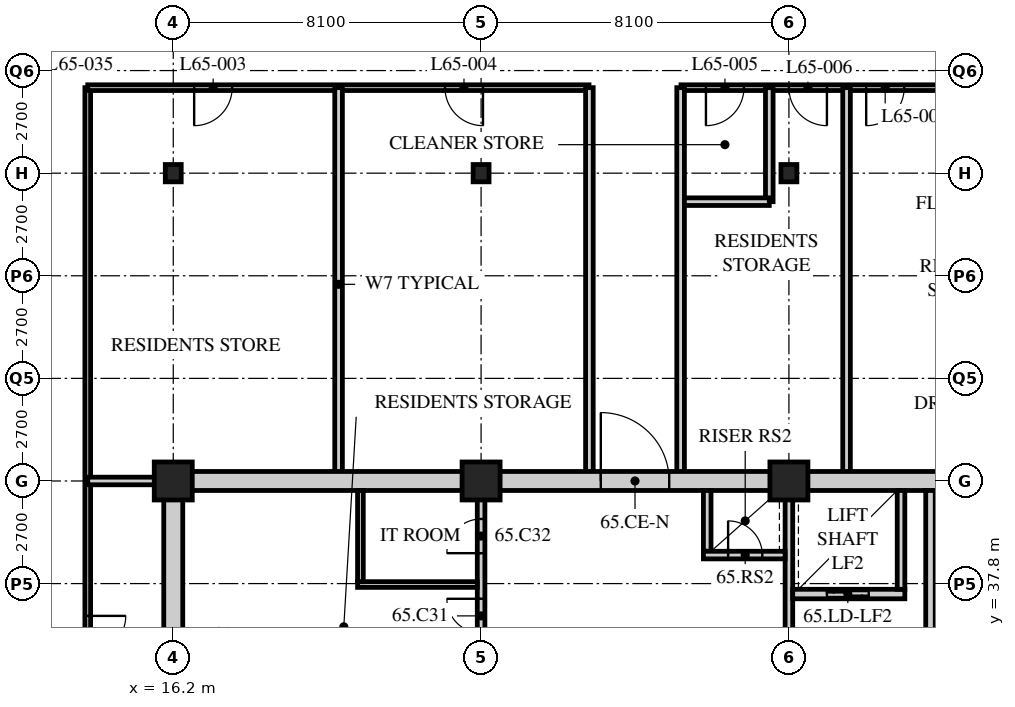
"""IFC4 building model, lengths in metres.
Left out: names, types, materials, properties, quantities, classifications, styles, units other than length and angle.
Written with IfcOpenShell. Run it as: python <this file> out.ifc"""

import sys

from ifc_helpers import new_model, si_unit, direction, frame, frame_2d, origin, origin_2d, place, context, subcontext, project, spatial, rectangle, hollow_rectangle, i_section, extrude, element, fill, save


model = new_model("IFC4")
c1 = context("Model", 3, precision=1e-05, world=origin(), true_north=direction((0.0, 1.0)))
c2 = subcontext(c1, "Body", "Model", "MODEL_VIEW")
j1 = project(units=[si_unit("LENGTHUNIT", "METRE"), si_unit("PLANEANGLEUNIT", "RADIAN")], contexts=[c1])
p1 = place(None, origin())
s1 = spatial("IfcSite", under=j1, at=p1, CompositionType="ELEMENT")
p2 = place(p1, origin())
s2 = spatial("IfcBuilding", under=s1, at=p2, CompositionType="ELEMENT")
p3 = place(p2, frame((0.0, 0.0, 254.1)))
s3 = spatial("IfcBuildingStorey", under=s2, at=p3, CompositionType="ELEMENT", Elevation=254.1)
p4 = place(p3, frame((16.2, 40.5, 0.0), z_axis=(0.0, 0.0, 1.0), x_axis=(1.0, 0.0, 0.0)))
e1 = element("IfcColumn", 1, at=p4, inside=s3, PredefinedType="COLUMN", context=c2, shape_type="SweptSolid", body=[
    extrude(hollow_rectangle(XDim=1.0, YDim=1.0, WallThickness=0.1, at=origin_2d()), origin(), (0.0, 0.0, 1.0), 3.9),
])
p5 = place(p3, frame((16.2, 48.6, 0.0), z_axis=(0.0, 0.0, 1.0), x_axis=(1.0, 0.0, 0.0)))
e2 = element("IfcColumn", 2, at=p5, inside=s3, PredefinedType="COLUMN", context=c2, shape_type="SweptSolid", body=[
    extrude(i_section(OverallWidth=0.418, OverallDepth=0.456, WebThickness=0.042, FlangeThickness=0.067, FilletRadius=0.015, at=origin_2d()), origin(), (0.0, 0.0, 1.0), 3.9),
])
p6 = place(p3, frame((24.3, 40.5, 0.0), z_axis=(0.0, 0.0, 1.0), x_axis=(1.0, 0.0, 0.0)))
e3 = element("IfcColumn", 3, at=p6, inside=s3, PredefinedType="COLUMN", context=c2, shape_type="SweptSolid", body=[
    extrude(hollow_rectangle(XDim=1.0, YDim=1.0, WallThickness=0.1, at=origin_2d()), origin(), (0.0, 0.0, 1.0), 3.9),
])
p7 = place(p3, frame((24.3, 48.6, 0.0), z_axis=(0.0, 0.0, 1.0), x_axis=(1.0, 0.0, 0.0)))
e4 = element("IfcColumn", 4, at=p7, inside=s3, PredefinedType="COLUMN", context=c2, shape_type="SweptSolid", body=[
    extrude(i_section(OverallWidth=0.418, OverallDepth=0.456, WebThickness=0.042, FlangeThickness=0.067, FilletRadius=0.015, at=origin_2d()), origin(), (0.0, 0.0, 1.0), 3.9),
])
p8 = place(p3, frame((32.4, 40.5, 0.0), z_axis=(0.0, 0.0, 1.0), x_axis=(1.0, 0.0, 0.0)))
e5 = element("IfcColumn", 5, at=p8, inside=s3, PredefinedType="COLUMN", context=c2, shape_type="SweptSolid", body=[
    extrude(hollow_rectangle(XDim=1.0, YDim=1.0, WallThickness=0.1, at=origin_2d()), origin(), (0.0, 0.0, 1.0), 3.9),
])
p9 = place(p3, frame((32.4, 48.6, 0.0), z_axis=(0.0, 0.0, 1.0), x_axis=(1.0, 0.0, 0.0)))
e6 = element("IfcColumn", 6, at=p9, inside=s3, PredefinedType="COLUMN", context=c2, shape_type="SweptSolid", body=[
    extrude(i_section(OverallWidth=0.418, OverallDepth=0.456, WebThickness=0.042, FlangeThickness=0.067, FilletRadius=0.015, at=origin_2d()), origin(), (0.0, 0.0, 1.0), 3.9),
])
p10 = place(p3, frame((13.95, 24.3, 0.0), z_axis=(0.0, 0.0, 1.0), x_axis=(0.0, 1.0, 0.0)))
e7 = element("IfcWall", 7, at=p10, inside=s3, PredefinedType="PARTITIONING", context=c2, shape_type="SweptSolid", body=[
    extrude(rectangle(XDim=26.55, YDim=0.15, at=frame_2d((13.275, 0.0))), origin(), (0.0, 0.0, 1.0), 3.69),
])
p11 = place(p10, frame((3.55, 0.0, 0.0)))
e8 = element("IfcOpeningElement", 8, at=p11, cuts=e7, PredefinedType="OPENING", context=c2, shape_type="SweptSolid", body=[
    extrude(rectangle(XDim=1.0, YDim=2.1, at=frame_2d((0.5, 1.05))), frame((0.0, 0.085, 0.0), z_axis=(0.0, -1.0, 0.0), x_axis=(1.0, 0.0, 0.0)), (0.0, 0.0, 1.0), 0.17),
])
p12 = place(p10, frame((11.65, 0.0, 0.0)))
e9 = element("IfcOpeningElement", 9, at=p12, cuts=e7, PredefinedType="OPENING", context=c2, shape_type="SweptSolid", body=[
    extrude(rectangle(XDim=1.0, YDim=2.1, at=frame_2d((0.5, 1.05))), frame((0.0, 0.085, 0.0), z_axis=(0.0, -1.0, 0.0), x_axis=(1.0, 0.0, 0.0)), (0.0, 0.0, 1.0), 0.17),
])
p13 = place(p3, frame((13.95, 50.85, 0.0), z_axis=(0.0, 0.0, 1.0), x_axis=(1.0, 0.0, 0.0)))
e10 = element("IfcWall", 10, at=p13, inside=s3, PredefinedType="PARTITIONING", context=c2, shape_type="SweptSolid", body=[
    extrude(rectangle(XDim=13.19, YDim=0.15, at=frame_2d((6.595, 0.0))), origin(), (0.0, 0.0, 1.0), 3.69),
])
p14 = place(p13, frame((2.8, 0.0, 0.0)))
e11 = element("IfcOpeningElement", 11, at=p14, cuts=e10, PredefinedType="OPENING", context=c2, shape_type="SweptSolid", body=[
    extrude(rectangle(XDim=1.0, YDim=2.1, at=frame_2d((0.5, 1.05))), frame((0.0, 0.085, 0.0), z_axis=(0.0, -1.0, 0.0), x_axis=(1.0, 0.0, 0.0)), (0.0, 0.0, 1.0), 0.17),
])
p15 = place(p13, frame((9.4, 0.0, 0.0)))
e12 = element("IfcOpeningElement", 12, at=p15, cuts=e10, PredefinedType="OPENING", context=c2, shape_type="SweptSolid", body=[
    extrude(rectangle(XDim=1.0, YDim=2.1, at=frame_2d((0.5, 1.05))), frame((0.0, 0.085, 0.0), z_axis=(0.0, -1.0, 0.0), x_axis=(1.0, 0.0, 0.0)), (0.0, 0.0, 1.0), 0.17),
])
p16 = place(p3, frame((29.56, 50.85, 0.0), z_axis=(0.0, 0.0, 1.0), x_axis=(1.0, 0.0, 0.0)))
e13 = element("IfcWall", 13, at=p16, inside=s3, PredefinedType="PARTITIONING", context=c2, shape_type="SweptSolid", body=[
    extrude(rectangle(XDim=6.89, YDim=0.15, at=frame_2d((3.445, 0.0))), origin(), (0.0, 0.0, 1.0), 3.69),
])
p17 = place(p16, frame((0.657, 0.0, 0.0)))
e14 = element("IfcOpeningElement", 14, at=p17, cuts=e13, PredefinedType="OPENING", context=c2, shape_type="SweptSolid", body=[
    extrude(rectangle(XDim=1.0, YDim=2.1, at=frame_2d((0.5, 1.05))), frame((0.0, 0.085, 0.0), z_axis=(0.0, -1.0, 0.0), x_axis=(1.0, 0.0, 0.0)), (0.0, 0.0, 1.0), 0.17),
])
p18 = place(p16, frame((2.84, 0.0, 0.0)))
e15 = element("IfcOpeningElement", 15, at=p18, cuts=e13, PredefinedType="OPENING", context=c2, shape_type="SweptSolid", body=[
    extrude(rectangle(XDim=1.0, YDim=2.1, at=frame_2d((0.5, 1.05))), frame((0.0, 0.085, 0.0), z_axis=(0.0, -1.0, 0.0), x_axis=(1.0, 0.0, 0.0)), (0.0, 0.0, 1.0), 0.17),
])
p19 = place(p16, frame((4.873, 0.0, 0.0)))
e16 = element("IfcOpeningElement", 16, at=p19, cuts=e13, PredefinedType="OPENING", context=c2, shape_type="SweptSolid", body=[
    extrude(rectangle(XDim=1.0, YDim=2.1, at=frame_2d((0.5, 1.05))), frame((0.0, 0.085, 0.0), z_axis=(0.0, -1.0, 0.0), x_axis=(1.0, 0.0, 0.0)), (0.0, 0.0, 1.0), 0.17),
])
p20 = place(p3, frame((20.55, 50.85, 0.0), z_axis=(0.0, 0.0, 1.0), x_axis=(0.0, -1.0, 0.0)))
e17 = element("IfcWall", 17, at=p20, inside=s3, PredefinedType="SOLIDWALL", context=c2, shape_type="SweptSolid", body=[
    extrude(rectangle(XDim=10.35, YDim=0.2, at=frame_2d((5.175, 0.0))), origin(), (0.0, 0.0, 1.0), 3.69),
])
p21 = place(p3, frame((31.883, 50.85, 0.0), z_axis=(0.0, 0.0, 1.0), x_axis=(0.0, -1.0, 0.0)))
e18 = element("IfcWall", 18, at=p21, inside=s3, PredefinedType="SOLIDWALL", context=c2, shape_type="SweptSolid", body=[
    extrude(rectangle(XDim=3.0, YDim=0.2, at=frame_2d((1.5, 0.0))), origin(), (0.0, 0.0, 1.0), 3.69),
])
p22 = place(p3, frame((29.55, 47.85, 0.0), z_axis=(0.0, 0.0, 1.0), x_axis=(1.0, 0.0, 0.0)))
e19 = element("IfcWall", 19, at=p22, inside=s3, PredefinedType="SOLIDWALL", context=c2, shape_type="SweptSolid", body=[
    extrude(rectangle(XDim=2.333, YDim=0.2, at=frame_2d((1.167, 0.0))), origin(), (0.0, 0.0, 1.0), 3.69),
])
for number, where, z_axis, x_axis in (
    (20, (33.917, 50.85, 0.0), (0.0, 0.0, 1.0), (0.0, -1.0, 0.0)),
    (21, (27.15, 40.5, 0.0), (0.0, 0.0, 1.0), (0.0, 1.0, 0.0)),
    (22, (29.55, 40.5, 0.0), (0.0, 0.0, 1.0), (0.0, 1.0, 0.0)),
):
    element("IfcWall", number, at=place(p3, frame(where, z_axis=z_axis, x_axis=x_axis)), inside=s3, PredefinedType="SOLIDWALL", context=c2, shape_type="SweptSolid", body=[
        extrude(rectangle(XDim=10.35, YDim=0.2, at=frame_2d((5.175, 0.0))), origin(), (0.0, 0.0, 1.0), 3.69),
    ])
p23 = place(p3, frame((13.95, 40.5, 0.0), z_axis=(0.0, 0.0, 1.0), x_axis=(1.0, 0.0, 0.0)))
e23 = element("IfcWall", 23, at=p23, inside=s3, PredefinedType="SOLIDWALL", context=c2, shape_type="SweptSolid", body=[
    extrude(rectangle(XDim=2.25, YDim=0.2, at=frame_2d((1.125, 0.0))), origin(), (0.0, 0.0, 1.0), 3.078),
])
p24 = place(p3, frame((15.95, 40.5, 0.0), z_axis=(0.0, 0.0, 1.0), x_axis=(1.0, 0.0, 0.0)))
e24 = element("IfcWall", 24, at=p24, inside=s3, PredefinedType="SOLIDWALL", context=c2, shape_type="SweptSolid", body=[
    extrude(rectangle(XDim=24.55, YDim=0.5, at=frame_2d((12.275, 0.0))), origin(), (0.0, 0.0, 1.0), 3.04),
])
p25 = place(p24, frame((11.5, 0.0, 0.0)))
e25 = element("IfcOpeningElement", 25, at=p25, cuts=e24, PredefinedType="OPENING", context=c2, shape_type="SweptSolid", body=[
    extrude(rectangle(XDim=1.8, YDim=2.4, at=frame_2d((0.9, 1.2))), frame((0.0, 0.26, 0.0), z_axis=(0.0, -1.0, 0.0), x_axis=(1.0, 0.0, 0.0)), (0.0, 0.0, 1.0), 0.52),
])
p26 = place(p3, frame((16.2, 24.55, 0.0), z_axis=(0.0, 0.0, 1.0), x_axis=(0.0, 1.0, 0.0)))
e26 = element("IfcWall", 26, at=p26, inside=s3, PredefinedType="SOLIDWALL", context=c2, shape_type="SweptSolid", body=[
    extrude(rectangle(XDim=15.7, YDim=0.5, at=frame_2d((7.85, 0.0))), origin(), (0.0, 0.0, 1.0), 3.078),
])
p27 = place(p3, frame((32.4, 32.5, 0.0), z_axis=(0.0, 0.0, 1.0), x_axis=(0.0, 1.0, 0.0)))
e27 = element("IfcWall", 27, at=p27, inside=s3, PredefinedType="SOLIDWALL", context=c2, shape_type="SweptSolid", body=[
    extrude(rectangle(XDim=7.75, YDim=0.2, at=frame_2d((3.875, 0.0))), origin(), (0.0, 0.0, 1.0), 3.078),
])
p28 = place(p27, frame((1.9, 0.0, 0.0)))
e28 = element("IfcOpeningElement", 28, at=p28, cuts=e27, PredefinedType="OPENING", context=c2, shape_type="SweptSolid", body=[
    extrude(rectangle(XDim=1.2, YDim=2.1, at=frame_2d((0.6, 1.05))), frame((0.0, 0.11, 0.0), z_axis=(0.0, -1.0, 0.0), x_axis=(1.0, 0.0, 0.0)), (0.0, 0.0, 1.0), 0.22),
])
p29 = place(p3, frame((36.125, 32.5, 0.0), z_axis=(0.0, 0.0, 1.0), x_axis=(0.0, 1.0, 0.0)))
e29 = element("IfcWall", 29, at=p29, inside=s3, PredefinedType="SOLIDWALL", context=c2, shape_type="SweptSolid", body=[
    extrude(rectangle(XDim=7.75, YDim=0.25, at=frame_2d((3.875, 0.0))), origin(), (0.0, 0.0, 1.0), 3.69),
])
p30 = place(p29, frame((0.45, 0.0, 0.0)))
e30 = element("IfcOpeningElement", 30, at=p30, cuts=e29, PredefinedType="OPENING", context=c2, shape_type="SweptSolid", body=[
    extrude(rectangle(XDim=1.2, YDim=2.1, at=frame_2d((0.6, 1.05))), frame((0.0, 0.135, 0.0), z_axis=(0.0, -1.0, 0.0), x_axis=(1.0, 0.0, 0.0)), (0.0, 0.0, 1.0), 0.27),
])
p31 = place(p3, frame((32.5, 37.525, 0.0), z_axis=(0.0, 0.0, 1.0), x_axis=(1.0, 0.0, 0.0)))
e31 = element("IfcWall", 31, at=p31, inside=s3, PredefinedType="SOLIDWALL", context=c2, shape_type="SweptSolid", body=[
    extrude(rectangle(XDim=2.95, YDim=0.25, at=frame_2d((1.475, 0.0))), origin(), (0.0, 0.0, 1.0), 3.69),
])
p32 = place(p31, frame((0.9, 0.0, 0.0)))
e32 = element("IfcOpeningElement", 32, at=p32, cuts=e31, PredefinedType="OPENING", context=c2, shape_type="SweptSolid", body=[
    extrude(rectangle(XDim=1.1, YDim=2.4, at=frame_2d((0.55, 1.2))), frame((0.0, 0.135, 0.0), z_axis=(0.0, -1.0, 0.0), x_axis=(1.0, 0.0, 0.0)), (0.0, 0.0, 1.0), 0.27),
])
p33 = place(p3, frame((35.35, 37.65, 0.0), z_axis=(0.0, 0.0, 1.0), x_axis=(0.0, 1.0, 0.0)))
e33 = element("IfcWall", 33, at=p33, inside=s3, PredefinedType="SOLIDWALL", context=c2, shape_type="SweptSolid", body=[
    extrude(rectangle(XDim=2.6, YDim=0.2, at=frame_2d((1.3, 0.0))), origin(), (0.0, 0.0, 1.0), 3.69),
])
p34 = place(p3, frame((30.25, 38.65, 0.0), z_axis=(0.0, 0.0, 1.0), x_axis=(0.0, 1.0, 0.0)))
e34 = element("IfcWall", 34, at=p34, inside=s3, PredefinedType="SOLIDWALL", context=c2, shape_type="SweptSolid", body=[
    extrude(rectangle(XDim=1.6, YDim=0.2, at=frame_2d((0.8, 0.0))), origin(), (0.0, 0.0, 1.0), 3.69),
])
p35 = place(p3, frame((30.15, 38.55, 0.0), z_axis=(0.0, 0.0, 1.0), x_axis=(1.0, 0.0, 0.0)))
e35 = element("IfcWall", 35, at=p35, inside=s3, PredefinedType="SOLIDWALL", context=c2, shape_type="SweptSolid", body=[
    extrude(rectangle(XDim=2.15, YDim=0.2, at=frame_2d((1.075, 0.0))), origin(), (0.0, 0.0, 1.0), 3.69),
])
p36 = place(p35, frame((0.65, 0.0, 0.0)))
e36 = element("IfcOpeningElement", 36, at=p36, cuts=e35, PredefinedType="OPENING", context=c2, shape_type="SweptSolid", body=[
    extrude(rectangle(XDim=0.9, YDim=2.1, at=frame_2d((0.45, 1.05))), frame((0.0, 0.11, 0.0), z_axis=(0.0, -1.0, 0.0), x_axis=(1.0, 0.0, 0.0)), (0.0, 0.0, 1.0), 0.22),
])
p37 = place(p3, frame((24.3, 32.5, 0.0), z_axis=(0.0, 0.0, 1.0), x_axis=(0.0, 1.0, 0.0)))
e37 = element("IfcWall", 37, at=p37, inside=s3, PredefinedType="PARTITIONING", context=c2, shape_type="SweptSolid", body=[
    extrude(rectangle(XDim=7.75, YDim=0.2, at=frame_2d((3.875, 0.0))), origin(), (0.0, 0.0, 1.0), 3.078),
])
p38 = place(p37, frame((1.275, 0.0, 0.0)))
e38 = element("IfcOpeningElement", 38, at=p38, cuts=e37, PredefinedType="OPENING", context=c2, shape_type="SweptSolid", body=[
    extrude(rectangle(XDim=1.0, YDim=2.1, at=frame_2d((0.5, 1.05))), frame((0.0, 0.11, 0.0), z_axis=(0.0, -1.0, 0.0), x_axis=(1.0, 0.0, 0.0)), (0.0, 0.0, 1.0), 0.22),
])
p39 = place(p37, frame((4.0, 0.0, 0.0)))
e39 = element("IfcOpeningElement", 39, at=p39, cuts=e37, PredefinedType="OPENING", context=c2, shape_type="SweptSolid", body=[
    extrude(rectangle(XDim=0.9, YDim=2.1, at=frame_2d((0.45, 1.05))), frame((0.0, 0.11, 0.0), z_axis=(0.0, -1.0, 0.0), x_axis=(1.0, 0.0, 0.0)), (0.0, 0.0, 1.0), 0.22),
])
p40 = place(p37, frame((6.1, 0.0, 0.0)))
e40 = element("IfcOpeningElement", 40, at=p40, cuts=e37, PredefinedType="OPENING", context=c2, shape_type="SweptSolid", body=[
    extrude(rectangle(XDim=0.9, YDim=2.1, at=frame_2d((0.45, 1.05))), frame((0.0, 0.11, 0.0), z_axis=(0.0, -1.0, 0.0), x_axis=(1.0, 0.0, 0.0)), (0.0, 0.0, 1.0), 0.22),
])
p41 = place(p3, frame((21.05, 37.775, 0.0), z_axis=(0.0, 0.0, 1.0), x_axis=(1.0, 0.0, 0.0)))
e41 = element("IfcWall", 41, at=p41, inside=s3, PredefinedType="PARTITIONING", context=c2, shape_type="SweptSolid", body=[
    extrude(rectangle(XDim=3.15, YDim=0.15, at=frame_2d((1.575, 0.0))), origin(), (0.0, 0.0, 1.0), 3.69),
])
p42 = place(p3, frame((21.125, 37.85, 0.0), z_axis=(0.0, 0.0, 1.0), x_axis=(0.0, 1.0, 0.0)))
e42 = element("IfcWall", 42, at=p42, inside=s3, PredefinedType="PARTITIONING", context=c2, shape_type="SweptSolid", body=[
    extrude(rectangle(XDim=2.4, YDim=0.15, at=frame_2d((1.2, 0.0))), origin(), (0.0, 0.0, 1.0), 3.69),
])
p43 = place(p12, origin())
e43 = element("IfcDoor", 43, at=p43, inside=s3, OperationType="SINGLE_SWING_LEFT", PredefinedType="DOOR", context=c2, shape_type="SweptSolid", body=[
    extrude(rectangle(XDim=1.0, YDim=2.1, at=frame_2d((0.5, 1.05))), frame((0.0, 0.025, 0.0), z_axis=(0.0, -1.0, 0.0), x_axis=(1.0, 0.0, 0.0)), (0.0, 0.0, 1.0), 0.05),
])
fill(e9, e43)
p44 = place(p14, origin())
e44 = element("IfcDoor", 44, at=p44, inside=s3, OperationType="SINGLE_SWING_RIGHT", PredefinedType="DOOR", context=c2, shape_type="SweptSolid", body=[
    extrude(rectangle(XDim=1.0, YDim=2.1, at=frame_2d((0.5, 1.05))), frame((0.0, 0.025, 0.0), z_axis=(0.0, -1.0, 0.0), x_axis=(1.0, 0.0, 0.0)), (0.0, 0.0, 1.0), 0.05),
])
fill(e11, e44)
p45 = place(p15, origin())
e45 = element("IfcDoor", 45, at=p45, inside=s3, OperationType="SINGLE_SWING_LEFT", PredefinedType="DOOR", context=c2, shape_type="SweptSolid", body=[
    extrude(rectangle(XDim=1.0, YDim=2.1, at=frame_2d((0.5, 1.05))), frame((0.0, 0.025, 0.0), z_axis=(0.0, -1.0, 0.0), x_axis=(1.0, 0.0, 0.0)), (0.0, 0.0, 1.0), 0.05),
])
fill(e12, e45)
p46 = place(p17, origin())
e46 = element("IfcDoor", 46, at=p46, inside=s3, OperationType="SINGLE_SWING_RIGHT", PredefinedType="DOOR", context=c2, shape_type="SweptSolid", body=[
    extrude(rectangle(XDim=1.0, YDim=2.1, at=frame_2d((0.5, 1.05))), frame((0.0, 0.025, 0.0), z_axis=(0.0, -1.0, 0.0), x_axis=(1.0, 0.0, 0.0)), (0.0, 0.0, 1.0), 0.05),
])
fill(e14, e46)
p47 = place(p18, origin())
e47 = element("IfcDoor", 47, at=p47, inside=s3, OperationType="SINGLE_SWING_LEFT", PredefinedType="DOOR", context=c2, shape_type="SweptSolid", body=[
    extrude(rectangle(XDim=1.0, YDim=2.1, at=frame_2d((0.5, 1.05))), frame((0.0, 0.025, 0.0), z_axis=(0.0, -1.0, 0.0), x_axis=(1.0, 0.0, 0.0)), (0.0, 0.0, 1.0), 0.05),
])
fill(e15, e47)
p48 = place(p19, origin())
e48 = element("IfcDoor", 48, at=p48, inside=s3, OperationType="SINGLE_SWING_RIGHT", PredefinedType="DOOR", context=c2, shape_type="SweptSolid", body=[
    extrude(rectangle(XDim=1.0, YDim=2.1, at=frame_2d((0.5, 1.05))), frame((0.0, 0.025, 0.0), z_axis=(0.0, -1.0, 0.0), x_axis=(1.0, 0.0, 0.0)), (0.0, 0.0, 1.0), 0.05),
])
fill(e16, e48)
p49 = place(p39, origin())
e49 = element("IfcDoor", 49, at=p49, inside=s3, OperationType="SINGLE_SWING_RIGHT", PredefinedType="DOOR", context=c2, shape_type="SweptSolid", body=[
    extrude(rectangle(XDim=0.9, YDim=2.1, at=frame_2d((0.45, 1.05))), frame((0.0, 0.025, 0.0), z_axis=(0.0, -1.0, 0.0), x_axis=(1.0, 0.0, 0.0)), (0.0, 0.0, 1.0), 0.05),
])
fill(e39, e49)
p50 = place(p40, origin())
e50 = element("IfcDoor", 50, at=p50, inside=s3, OperationType="SINGLE_SWING_LEFT", PredefinedType="DOOR", context=c2, shape_type="SweptSolid", body=[
    extrude(rectangle(XDim=0.9, YDim=2.1, at=frame_2d((0.45, 1.05))), frame((0.0, 0.025, 0.0), z_axis=(0.0, -1.0, 0.0), x_axis=(1.0, 0.0, 0.0)), (0.0, 0.0, 1.0), 0.05),
])
fill(e40, e50)
p51 = place(p36, origin())
e51 = element("IfcDoor", 51, at=p51, inside=s3, OperationType="SINGLE_SWING_LEFT", PredefinedType="DOOR", context=c2, shape_type="SweptSolid", body=[
    extrude(rectangle(XDim=0.9, YDim=2.1, at=frame_2d((0.45, 1.05))), frame((0.0, 0.025, 0.0), z_axis=(0.0, -1.0, 0.0), x_axis=(1.0, 0.0, 0.0)), (0.0, 0.0, 1.0), 0.05),
])
fill(e36, e51)
p52 = place(p32, origin())
e52 = element("IfcDoor", 52, at=p52, inside=s3, OperationType="DOUBLE_DOOR_SLIDING", PredefinedType="DOOR", context=c2, shape_type="SweptSolid", body=[
    extrude(rectangle(XDim=1.1, YDim=2.4, at=frame_2d((0.55, 1.2))), frame((0.0, 0.025, 0.0), z_axis=(0.0, -1.0, 0.0), x_axis=(1.0, 0.0, 0.0)), (0.0, 0.0, 1.0), 0.05),
])
fill(e32, e52)
p53 = place(p25, origin())
e53 = element("IfcDoor", 53, at=p53, inside=s3, OperationType="DOUBLE_DOOR_SINGLE_SWING", PredefinedType="DOOR", context=c2, shape_type="SweptSolid", body=[
    extrude(rectangle(XDim=1.8, YDim=2.4, at=frame_2d((0.9, 1.2))), frame((0.0, 0.025, 0.0), z_axis=(0.0, -1.0, 0.0), x_axis=(1.0, 0.0, 0.0)), (0.0, 0.0, 1.0), 0.05),
])
fill(e25, e53)
save(model, sys.argv[1])
